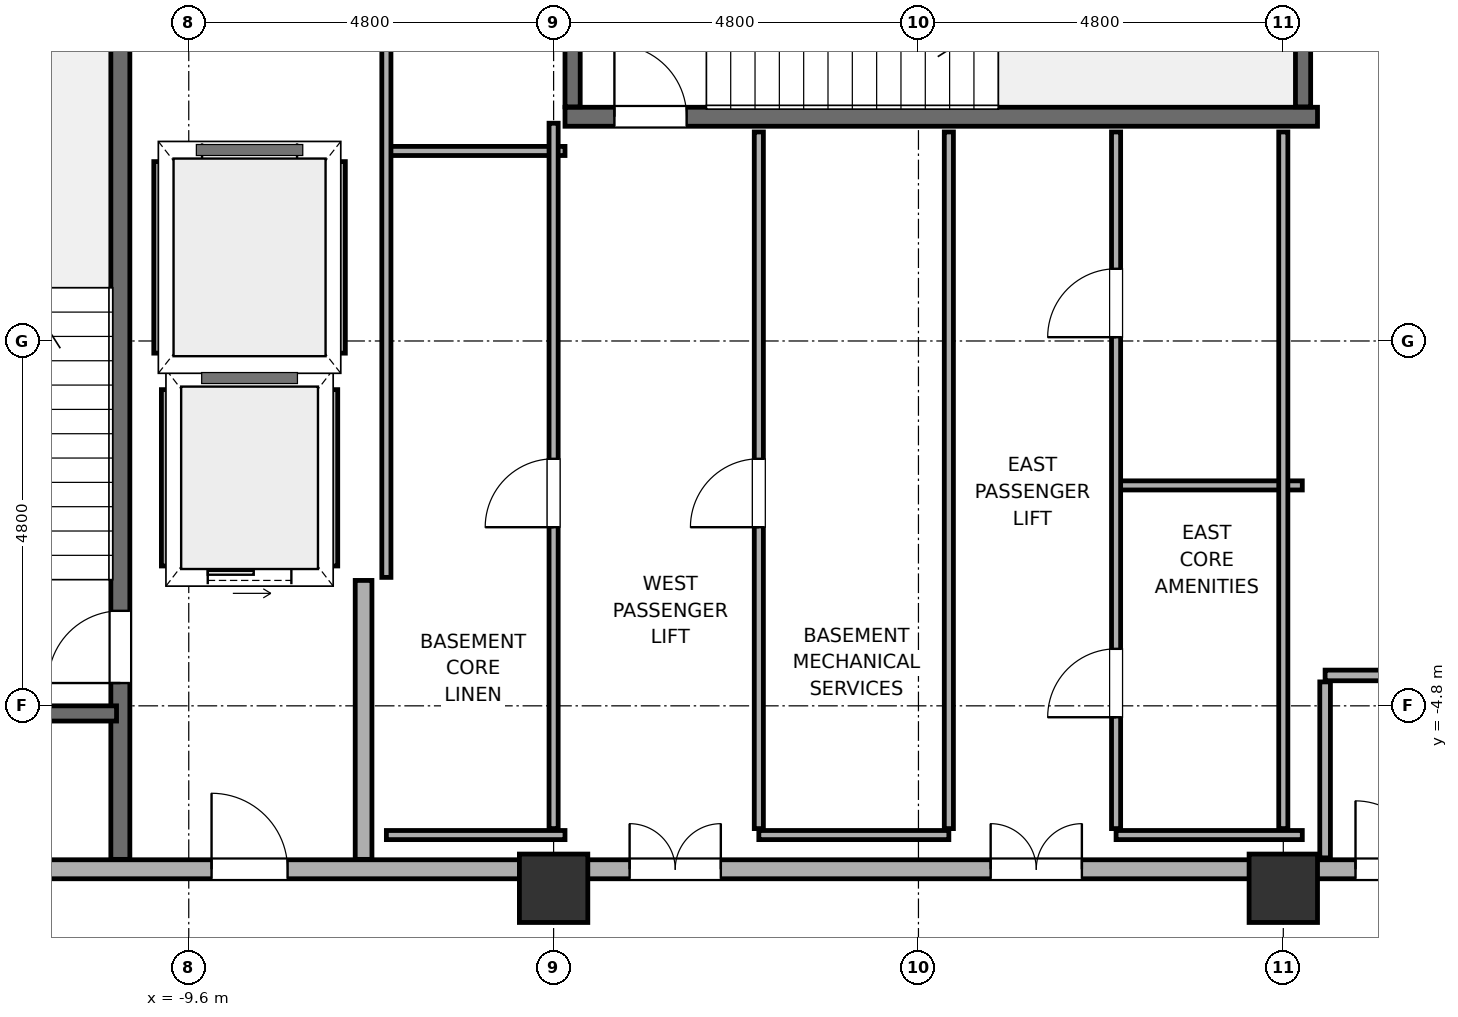
"""IFC4 building model, lengths in metres.
Left out: names, types, materials, properties, quantities, classifications, styles, units other than length and angle.
Written with IfcOpenShell. Run it as: python <this file> out.ifc"""

import sys

from ifc_helpers import new_model, si_unit, direction, frame, frame_2d, origin, origin_2d, place, context, subcontext, project, spatial, rectangle, hollow_rectangle, extrude, element, fill, save


model = new_model("IFC4")
c1 = context("Model", 3, precision=1e-05, world=origin(), true_north=direction((0.0, 1.0)))
c2 = subcontext(c1, "Body", "Model", "MODEL_VIEW")
j1 = project(units=[si_unit("LENGTHUNIT", "METRE"), si_unit("PLANEANGLEUNIT", "RADIAN")], contexts=[c1])
p1 = place(None, origin())
s1 = spatial("IfcSite", under=j1, at=p1, CompositionType="ELEMENT")
p2 = place(p1, origin())
s2 = spatial("IfcBuilding", under=s1, at=p2, CompositionType="ELEMENT")
p3 = place(p2, frame((0.0, 0.0, -10.2)))
s3 = spatial("IfcBuildingStorey", under=s2, at=p3, CompositionType="ELEMENT", Elevation=-10.2)
for number, where, z_axis, x_axis in (
    (1, (-4.8, -7.2, -0.25), (0.0, 0.0, 1.0), (1.0, 0.0, 0.0)),
    (2, (4.8, -7.2, -0.25), (0.0, 0.0, 1.0), (1.0, 0.0, 0.0)),
):
    element("IfcColumn", number, at=place(p3, frame(where, z_axis=z_axis, x_axis=x_axis)), inside=s3, PredefinedType="COLUMN", context=c2, shape_type="SweptSolid", body=[
        extrude(hollow_rectangle(XDim=0.9, YDim=0.9, WallThickness=0.04, at=origin_2d()), origin(), (0.0, 0.0, 1.0), 5.05),
    ])
p4 = place(p3, frame((-14.2, -6.95, 0.0), z_axis=(0.0, 0.0, 1.0), x_axis=(1.0, 0.0, 0.0)))
e3 = element("IfcWall", 3, at=p4, inside=s3, PredefinedType="SOLIDWALL", context=c2, shape_type="SweptSolid", body=[
    extrude(rectangle(XDim=9.4, YDim=0.25, at=frame_2d((4.7, 0.0))), origin(), (0.0, 0.0, 1.0), 3.55),
])
p5 = place(p4, frame((4.9, 0.0, 0.0)))
e4 = element("IfcOpeningElement", 4, at=p5, cuts=e3, PredefinedType="OPENING", context=c2, shape_type="SweptSolid", body=[
    extrude(rectangle(XDim=1.0, YDim=2.15, at=frame_2d((0.5, 1.075))), frame((0.0, 0.14, 0.0), z_axis=(0.0, -1.0, 0.0), x_axis=(1.0, 0.0, 0.0)), (0.0, 0.0, 1.0), 0.28),
])
p6 = place(p3, frame((-4.6, -6.95, 0.0), z_axis=(0.0, 0.0, 1.0), x_axis=(1.0, 0.0, 0.0)))
e5 = element("IfcWall", 5, at=p6, inside=s3, PredefinedType="SOLIDWALL", context=c2, shape_type="SweptSolid", body=[
    extrude(rectangle(XDim=9.2, YDim=0.25, at=frame_2d((4.6, 0.0))), origin(), (0.0, 0.0, 1.0), 3.35),
])
p7 = place(p6, frame((0.8, 0.0, 0.0)))
e6 = element("IfcOpeningElement", 6, at=p7, cuts=e5, PredefinedType="OPENING", context=c2, shape_type="SweptSolid", body=[
    extrude(rectangle(XDim=1.2, YDim=2.2, at=frame_2d((0.6, 1.1))), frame((0.0, 0.14, 0.0), z_axis=(0.0, -1.0, 0.0), x_axis=(1.0, 0.0, 0.0)), (0.0, 0.0, 1.0), 0.28),
])
p8 = place(p6, frame((5.55, 0.0, 0.0)))
e7 = element("IfcOpeningElement", 7, at=p8, cuts=e5, PredefinedType="OPENING", context=c2, shape_type="SweptSolid", body=[
    extrude(rectangle(XDim=1.2, YDim=2.2, at=frame_2d((0.6, 1.1))), frame((0.0, 0.14, 0.0), z_axis=(0.0, -1.0, 0.0), x_axis=(1.0, 0.0, 0.0)), (0.0, 0.0, 1.0), 0.28),
])
p9 = place(p3, frame((4.8, -6.95, 0.0), z_axis=(0.0, 0.0, 1.0), x_axis=(1.0, 0.0, 0.0)))
e8 = element("IfcWall", 8, at=p9, inside=s3, PredefinedType="SOLIDWALL", context=c2, shape_type="SweptSolid", body=[
    extrude(rectangle(XDim=9.4, YDim=0.25, at=frame_2d((4.7, 0.0))), origin(), (0.0, 0.0, 1.0), 3.55),
])
p10 = place(p9, frame((3.5, 0.0, 0.0)))
e9 = element("IfcOpeningElement", 9, at=p10, cuts=e8, PredefinedType="OPENING", context=c2, shape_type="SweptSolid", body=[
    extrude(rectangle(XDim=1.0, YDim=2.15, at=frame_2d((0.5, 1.075))), frame((0.0, 0.14, 0.0), z_axis=(0.0, -1.0, 0.0), x_axis=(1.0, 0.0, 0.0)), (0.0, 0.0, 1.0), 0.28),
])
p11 = place(p9, frame((0.95, 0.0, 0.0)))
e10 = element("IfcOpeningElement", 10, at=p11, cuts=e8, PredefinedType="OPENING", context=c2, shape_type="SweptSolid", body=[
    extrude(rectangle(XDim=0.9, YDim=2.1, at=frame_2d((0.45, 1.05))), frame((0.0, 0.14, 0.0), z_axis=(0.0, -1.0, 0.0), x_axis=(1.0, 0.0, 0.0)), (0.0, 0.0, 1.0), 0.28),
])
p12 = place(p3, frame((-7.3, -6.82, 0.0), z_axis=(0.0, 0.0, 1.0), x_axis=(0.0, 1.0, 0.0)))
e11 = element("IfcWall", 11, at=p12, inside=s3, PredefinedType="SOLIDWALL", context=c2, shape_type="SweptSolid", body=[
    extrude(rectangle(XDim=3.67, YDim=0.22, at=frame_2d((1.835, 0.0))), origin(), (0.0, 0.0, 1.0), 3.55),
])
p13 = place(p3, frame((-10.5, -6.82, -0.25), z_axis=(0.0, 0.0, 1.0), x_axis=(0.0, 1.0, 0.0)))
e12 = element("IfcWall", 12, at=p13, inside=s3, PredefinedType="SOLIDWALL", context=c2, shape_type="SweptSolid", body=[
    extrude(rectangle(XDim=13.64, YDim=0.25, at=frame_2d((6.82, 0.0))), origin(), (0.0, 0.0, 1.0), 4.8),
])
p14 = place(p13, frame((2.32, 0.0, 0.25)))
e13 = element("IfcOpeningElement", 13, at=p14, cuts=e12, PredefinedType="OPENING", context=c2, shape_type="SweptSolid", body=[
    extrude(rectangle(XDim=0.95, YDim=2.15, at=frame_2d((0.475, 1.075))), frame((0.0, 0.14, 0.0), z_axis=(0.0, -1.0, 0.0), x_axis=(1.0, 0.0, 0.0)), (0.0, 0.0, 1.0), 0.28),
])
p15 = place(p3, frame((-14.2, -4.9, -0.25), z_axis=(0.0, 0.0, 1.0), x_axis=(1.0, 0.0, 0.0)))
e14 = element("IfcWall", 14, at=p15, inside=s3, PredefinedType="SOLIDWALL", context=c2, shape_type="SweptSolid", body=[
    extrude(rectangle(XDim=3.65, YDim=0.2, at=frame_2d((1.825, 0.0))), origin(), (0.0, 0.0, 1.0), 4.8),
])
p16 = place(p3, frame((-4.65, 2.95, -0.25), z_axis=(0.0, 0.0, 1.0), x_axis=(1.0, 0.0, 0.0)))
e15 = element("IfcWall", 15, at=p16, inside=s3, PredefinedType="SOLIDWALL", context=c2, shape_type="SweptSolid", body=[
    extrude(rectangle(XDim=9.9, YDim=0.25, at=frame_2d((4.95, 0.0))), origin(), (0.0, 0.0, 1.0), 4.8),
])
p17 = place(p16, frame((0.65, 0.0, 0.25)))
e16 = element("IfcOpeningElement", 16, at=p17, cuts=e15, PredefinedType="OPENING", context=c2, shape_type="SweptSolid", body=[
    extrude(rectangle(XDim=0.95, YDim=2.15, at=frame_2d((0.475, 1.075))), frame((0.0, 0.14, 0.0), z_axis=(0.0, -1.0, 0.0), x_axis=(1.0, 0.0, 0.0)), (0.0, 0.0, 1.0), 0.28),
])
for number, where, z_axis, x_axis in (
    (17, (-4.55, 3.08, -0.25), (0.0, 0.0, 1.0), (0.0, 1.0, 0.0)),
    (18, (5.06, 3.08, -0.25), (0.0, 0.0, 1.0), (0.0, 1.0, 0.0)),
):
    element("IfcWall", number, at=place(p3, frame(where, z_axis=z_axis, x_axis=x_axis)), inside=s3, PredefinedType="SOLIDWALL", context=c2, shape_type="SweptSolid", body=[
        extrude(rectangle(XDim=3.74, YDim=0.2, at=frame_2d((1.87, 0.0))), origin(), (0.0, 0.0, 1.0), 4.8),
    ])
p18 = place(p3, frame((-9.82, -3.1, 0.0), z_axis=(0.0, 0.0, 1.0), x_axis=(1.0, 0.0, 0.0)))
e19 = element("IfcWall", 19, at=p18, inside=s3, PredefinedType="SOLIDWALL", context=c2, shape_type="SweptSolid", body=[
    extrude(rectangle(XDim=2.04, YDim=0.2, at=frame_2d((1.02, 0.0))), origin(), (0.0, 0.0, 1.0), 4.55),
])
p19 = place(p18, frame((0.47, 0.0, 0.0)))
e20 = element("IfcOpeningElement", 20, at=p19, cuts=e19, PredefinedType="OPENING", context=c2, shape_type="SweptSolid", body=[
    extrude(rectangle(XDim=1.1, YDim=2.2, at=frame_2d((0.55, 1.1))), frame((0.0, 0.115, 0.0), z_axis=(0.0, -1.0, 0.0), x_axis=(1.0, 0.0, 0.0)), (0.0, 0.0, 1.0), 0.23),
])
p20 = place(p3, frame((-9.82, -0.5, 0.0), z_axis=(0.0, 0.0, 1.0), x_axis=(1.0, 0.0, 0.0)))
e21 = element("IfcWall", 21, at=p20, inside=s3, PredefinedType="SOLIDWALL", context=c2, shape_type="SweptSolid", body=[
    extrude(rectangle(XDim=2.04, YDim=0.2, at=frame_2d((1.02, 0.0))), origin(), (0.0, 0.0, 1.0), 4.55),
])
for number, where, z_axis, x_axis in (
    (22, (-9.9, -2.96, 0.0), (0.0, 0.0, 1.0), (0.0, 1.0, 0.0)),
    (23, (-7.7, -2.96, 0.0), (0.0, 0.0, 1.0), (0.0, 1.0, 0.0)),
):
    element("IfcWall", number, at=place(p3, frame(where, z_axis=z_axis, x_axis=x_axis)), inside=s3, PredefinedType="PARTITIONING", context=c2, shape_type="SweptSolid", body=[
        extrude(rectangle(XDim=2.32, YDim=0.12, at=frame_2d((1.16, 0.0))), origin(), (0.0, 0.0, 1.0), 4.55),
    ])
p21 = place(p3, frame((-9.92, 2.5, 0.0), z_axis=(0.0, 0.0, 1.0), x_axis=(1.0, 0.0, 0.0)))
e24 = element("IfcWall", 24, at=p21, inside=s3, PredefinedType="SOLIDWALL", context=c2, shape_type="SweptSolid", body=[
    extrude(rectangle(XDim=2.24, YDim=0.2, at=frame_2d((1.12, 0.0))), origin(), (0.0, 0.0, 1.0), 4.55),
])
p22 = place(p21, frame((0.495, 0.0, 0.0)))
e25 = element("IfcOpeningElement", 25, at=p22, cuts=e24, PredefinedType="OPENING", context=c2, shape_type="SweptSolid", body=[
    extrude(rectangle(XDim=1.25, YDim=2.25, at=frame_2d((0.625, 1.125))), frame((0.0, 0.115, 0.0), z_axis=(0.0, -1.0, 0.0), x_axis=(1.0, 0.0, 0.0)), (0.0, 0.0, 1.0), 0.23),
])
p23 = place(p3, frame((-9.92, -0.3, 0.0), z_axis=(0.0, 0.0, 1.0), x_axis=(1.0, 0.0, 0.0)))
e26 = element("IfcWall", 26, at=p23, inside=s3, PredefinedType="SOLIDWALL", context=c2, shape_type="SweptSolid", body=[
    extrude(rectangle(XDim=2.24, YDim=0.2, at=frame_2d((1.12, 0.0))), origin(), (0.0, 0.0, 1.0), 4.55),
])
for number, where, z_axis, x_axis in (
    (27, (-10.0, -0.16, 0.0), (0.0, 0.0, 1.0), (0.0, 1.0, 0.0)),
    (28, (-7.6, -0.16, 0.0), (0.0, 0.0, 1.0), (0.0, 1.0, 0.0)),
):
    element("IfcWall", number, at=place(p3, frame(where, z_axis=z_axis, x_axis=x_axis)), inside=s3, PredefinedType="PARTITIONING", context=c2, shape_type="SweptSolid", body=[
        extrude(rectangle(XDim=2.52, YDim=0.12, at=frame_2d((1.26, 0.0))), origin(), (0.0, 0.0, 1.0), 4.55),
    ])
p24 = place(p3, frame((-7.0, -6.5, 0.0), z_axis=(0.0, 0.0, 1.0), x_axis=(1.0, 0.0, 0.0)))
e29 = element("IfcWall", 29, at=p24, inside=s3, PredefinedType="PARTITIONING", context=c2, shape_type="SweptSolid", body=[
    extrude(rectangle(XDim=2.35, YDim=0.12, at=frame_2d((1.175, 0.0))), origin(), (0.0, 0.0, 1.0), 4.55),
])
p25 = place(p3, frame((-2.1, -6.5, 0.0), z_axis=(0.0, 0.0, 1.0), x_axis=(1.0, 0.0, 0.0)))
e30 = element("IfcWall", 30, at=p25, inside=s3, PredefinedType="PARTITIONING", context=c2, shape_type="SweptSolid", body=[
    extrude(rectangle(XDim=2.5, YDim=0.12, at=frame_2d((1.25, 0.0))), origin(), (0.0, 0.0, 1.0), 4.55),
])
p26 = place(p3, frame((2.6, -6.5, 0.0), z_axis=(0.0, 0.0, 1.0), x_axis=(1.0, 0.0, 0.0)))
e31 = element("IfcWall", 31, at=p26, inside=s3, PredefinedType="PARTITIONING", context=c2, shape_type="SweptSolid", body=[
    extrude(rectangle(XDim=2.45, YDim=0.12, at=frame_2d((1.225, 0.0))), origin(), (0.0, 0.0, 1.0), 4.55),
])
p27 = place(p3, frame((5.35, -4.4, 0.0), z_axis=(0.0, 0.0, 1.0), x_axis=(1.0, 0.0, 0.0)))
e32 = element("IfcWall", 32, at=p27, inside=s3, PredefinedType="PLUMBINGWALL", context=c2, shape_type="SweptSolid", body=[
    extrude(rectangle(XDim=1.65, YDim=0.14, at=frame_2d((0.825, 0.0))), origin(), (0.0, 0.0, 1.0), 4.55),
])
p28 = place(p3, frame((2.6, -1.9, 0.0), z_axis=(0.0, 0.0, 1.0), x_axis=(1.0, 0.0, 0.0)))
e33 = element("IfcWall", 33, at=p28, inside=s3, PredefinedType="PARTITIONING", context=c2, shape_type="SweptSolid", body=[
    extrude(rectangle(XDim=2.45, YDim=0.12, at=frame_2d((1.225, 0.0))), origin(), (0.0, 0.0, 1.0), 4.55),
])
p29 = place(p3, frame((-7.0, 2.5, 0.0), z_axis=(0.0, 0.0, 1.0), x_axis=(1.0, 0.0, 0.0)))
e34 = element("IfcWall", 34, at=p29, inside=s3, PredefinedType="PARTITIONING", context=c2, shape_type="SweptSolid", body=[
    extrude(rectangle(XDim=2.35, YDim=0.12, at=frame_2d((1.175, 0.0))), origin(), (0.0, 0.0, 1.0), 4.55),
])
p30 = place(p3, frame((-7.0, -3.11, 0.0), z_axis=(0.0, 0.0, 1.0), x_axis=(0.0, 1.0, 0.0)))
e35 = element("IfcWall", 35, at=p30, inside=s3, PredefinedType="PARTITIONING", context=c2, shape_type="SweptSolid", body=[
    extrude(rectangle(XDim=9.575, YDim=0.12, at=frame_2d((4.788, 0.0))), origin(), (0.0, 0.0, 1.0), 4.55),
])
p31 = place(p30, frame((7.16, 0.0, 0.0)))
e36 = element("IfcOpeningElement", 36, at=p31, cuts=e35, PredefinedType="OPENING", context=c2, shape_type="SweptSolid", body=[
    extrude(rectangle(XDim=0.9, YDim=2.1, at=frame_2d((0.45, 1.05))), frame((0.0, 0.075, 0.0), z_axis=(0.0, -1.0, 0.0), x_axis=(1.0, 0.0, 0.0)), (0.0, 0.0, 1.0), 0.15),
])
p32 = place(p3, frame((-4.8, -6.415, 0.0), z_axis=(0.0, 0.0, 1.0), x_axis=(0.0, 1.0, 0.0)))
e37 = element("IfcWall", 37, at=p32, inside=s3, PredefinedType="PARTITIONING", context=c2, shape_type="SweptSolid", body=[
    extrude(rectangle(XDim=9.28, YDim=0.12, at=frame_2d((4.64, 0.0))), origin(), (0.0, 0.0, 1.0), 4.55),
])
p33 = place(p32, frame((3.965, 0.0, 0.0)))
e38 = element("IfcOpeningElement", 38, at=p33, cuts=e37, PredefinedType="OPENING", context=c2, shape_type="SweptSolid", body=[
    extrude(rectangle(XDim=0.9, YDim=2.1, at=frame_2d((0.45, 1.05))), frame((0.0, 0.075, 0.0), z_axis=(0.0, -1.0, 0.0), x_axis=(1.0, 0.0, 0.0)), (0.0, 0.0, 1.0), 0.15),
])
p34 = place(p3, frame((-2.1, -6.415, 0.0), z_axis=(0.0, 0.0, 1.0), x_axis=(0.0, 1.0, 0.0)))
e39 = element("IfcWall", 39, at=p34, inside=s3, PredefinedType="PARTITIONING", context=c2, shape_type="SweptSolid", body=[
    extrude(rectangle(XDim=9.165, YDim=0.12, at=frame_2d((4.583, 0.0))), origin(), (0.0, 0.0, 1.0), 4.55),
])
p35 = place(p34, frame((3.965, 0.0, 0.0)))
e40 = element("IfcOpeningElement", 40, at=p35, cuts=e39, PredefinedType="OPENING", context=c2, shape_type="SweptSolid", body=[
    extrude(rectangle(XDim=0.9, YDim=2.1, at=frame_2d((0.45, 1.05))), frame((0.0, 0.075, 0.0), z_axis=(0.0, -1.0, 0.0), x_axis=(1.0, 0.0, 0.0)), (0.0, 0.0, 1.0), 0.15),
])
p36 = place(p3, frame((0.4, -6.415, 0.0), z_axis=(0.0, 0.0, 1.0), x_axis=(0.0, 1.0, 0.0)))
e41 = element("IfcWall", 41, at=p36, inside=s3, PredefinedType="PARTITIONING", context=c2, shape_type="SweptSolid", body=[
    extrude(rectangle(XDim=9.165, YDim=0.12, at=frame_2d((4.583, 0.0))), origin(), (0.0, 0.0, 1.0), 4.55),
])
p37 = place(p3, frame((2.6, -6.415, 0.0), z_axis=(0.0, 0.0, 1.0), x_axis=(0.0, 1.0, 0.0)))
e42 = element("IfcWall", 42, at=p37, inside=s3, PredefinedType="PARTITIONING", context=c2, shape_type="SweptSolid", body=[
    extrude(rectangle(XDim=9.165, YDim=0.12, at=frame_2d((4.583, 0.0))), origin(), (0.0, 0.0, 1.0), 4.55),
])
p38 = place(p37, frame((1.465, 0.0, 0.0)))
e43 = element("IfcOpeningElement", 43, at=p38, cuts=e42, PredefinedType="OPENING", context=c2, shape_type="SweptSolid", body=[
    extrude(rectangle(XDim=0.9, YDim=2.1, at=frame_2d((0.45, 1.05))), frame((0.0, 0.075, 0.0), z_axis=(0.0, -1.0, 0.0), x_axis=(1.0, 0.0, 0.0)), (0.0, 0.0, 1.0), 0.15),
])
p39 = place(p37, frame((6.465, 0.0, 0.0)))
e44 = element("IfcOpeningElement", 44, at=p39, cuts=e42, PredefinedType="OPENING", context=c2, shape_type="SweptSolid", body=[
    extrude(rectangle(XDim=0.9, YDim=2.1, at=frame_2d((0.45, 1.05))), frame((0.0, 0.075, 0.0), z_axis=(0.0, -1.0, 0.0), x_axis=(1.0, 0.0, 0.0)), (0.0, 0.0, 1.0), 0.15),
])
p40 = place(p3, frame((4.8, -6.415, 0.0), z_axis=(0.0, 0.0, 1.0), x_axis=(0.0, 1.0, 0.0)))
e45 = element("IfcWall", 45, at=p40, inside=s3, PredefinedType="PARTITIONING", context=c2, shape_type="SweptSolid", body=[
    extrude(rectangle(XDim=9.165, YDim=0.12, at=frame_2d((4.583, 0.0))), origin(), (0.0, 0.0, 1.0), 4.55),
])
p41 = place(p3, frame((5.35, -6.8, 0.0), z_axis=(0.0, 0.0, 1.0), x_axis=(0.0, 1.0, 0.0)))
e46 = element("IfcWall", 46, at=p41, inside=s3, PredefinedType="PLUMBINGWALL", context=c2, shape_type="SweptSolid", body=[
    extrude(rectangle(XDim=2.315, YDim=0.14, at=frame_2d((1.157, 0.0))), origin(), (0.0, 0.0, 1.0), 3.55),
])
p42 = place(p5, origin())
e47 = element("IfcDoor", 47, at=p42, inside=s3, OperationType="SINGLE_SWING_RIGHT", PredefinedType="DOOR", context=c2, shape_type="SweptSolid", body=[
    extrude(rectangle(XDim=1.0, YDim=2.15, at=frame_2d((0.5, 1.075))), frame((0.0, 0.025, 0.0), z_axis=(0.0, -1.0, 0.0), x_axis=(1.0, 0.0, 0.0)), (0.0, 0.0, 1.0), 0.05),
])
fill(e4, e47)
p43 = place(p7, origin())
e48 = element("IfcDoor", 48, at=p43, inside=s3, OperationType="DOUBLE_DOOR_SINGLE_SWING", PredefinedType="DOOR", context=c2, shape_type="SweptSolid", body=[
    extrude(rectangle(XDim=1.2, YDim=2.2, at=frame_2d((0.6, 1.1))), frame((0.0, 0.025, 0.0), z_axis=(0.0, -1.0, 0.0), x_axis=(1.0, 0.0, 0.0)), (0.0, 0.0, 1.0), 0.05),
])
fill(e6, e48)
p44 = place(p8, origin())
e49 = element("IfcDoor", 49, at=p44, inside=s3, OperationType="DOUBLE_DOOR_SINGLE_SWING", PredefinedType="DOOR", context=c2, shape_type="SweptSolid", body=[
    extrude(rectangle(XDim=1.2, YDim=2.2, at=frame_2d((0.6, 1.1))), frame((0.0, 0.025, 0.0), z_axis=(0.0, -1.0, 0.0), x_axis=(1.0, 0.0, 0.0)), (0.0, 0.0, 1.0), 0.05),
])
fill(e7, e49)
p45 = place(p14, origin())
e50 = element("IfcDoor", 50, at=p45, inside=s3, OperationType="SINGLE_SWING_RIGHT", PredefinedType="DOOR", context=c2, shape_type="SweptSolid", body=[
    extrude(rectangle(XDim=0.95, YDim=2.15, at=frame_2d((0.475, 1.075))), frame((0.0, 0.025, 0.0), z_axis=(0.0, -1.0, 0.0), x_axis=(1.0, 0.0, 0.0)), (0.0, 0.0, 1.0), 0.05),
])
fill(e13, e50)
p46 = place(p17, origin())
e51 = element("IfcDoor", 51, at=p46, inside=s3, OperationType="SINGLE_SWING_RIGHT", PredefinedType="DOOR", context=c2, shape_type="SweptSolid", body=[
    extrude(rectangle(XDim=0.95, YDim=2.15, at=frame_2d((0.475, 1.075))), frame((0.0, 0.025, 0.0), z_axis=(0.0, -1.0, 0.0), x_axis=(1.0, 0.0, 0.0)), (0.0, 0.0, 1.0), 0.05),
])
fill(e16, e51)
p47 = place(p19, origin())
e52 = element("IfcDoor", 52, at=p47, inside=s3, OperationType="SLIDING_TO_LEFT", PredefinedType="DOOR", context=c2, shape_type="SweptSolid", body=[
    extrude(rectangle(XDim=1.1, YDim=2.2, at=frame_2d((0.55, 1.1))), frame((0.0, 0.025, 0.0), z_axis=(0.0, -1.0, 0.0), x_axis=(1.0, 0.0, 0.0)), (0.0, 0.0, 1.0), 0.05),
])
fill(e20, e52)
p48 = place(p22, origin())
e53 = element("IfcDoor", 53, at=p48, inside=s3, OperationType="SLIDING_TO_LEFT", PredefinedType="DOOR", context=c2, shape_type="SweptSolid", body=[
    extrude(rectangle(XDim=1.25, YDim=2.25, at=frame_2d((0.625, 1.125))), frame((0.0, 0.025, 0.0), z_axis=(0.0, -1.0, 0.0), x_axis=(1.0, 0.0, 0.0)), (0.0, 0.0, 1.0), 0.05),
])
fill(e25, e53)
p49 = place(p33, origin())
e54 = element("IfcDoor", 54, at=p49, inside=s3, OperationType="SINGLE_SWING_LEFT", PredefinedType="DOOR", context=c2, shape_type="SweptSolid", body=[
    extrude(rectangle(XDim=0.9, YDim=2.1, at=frame_2d((0.45, 1.05))), frame((0.0, 0.025, 0.0), z_axis=(0.0, -1.0, 0.0), x_axis=(1.0, 0.0, 0.0)), (0.0, 0.0, 1.0), 0.05),
])
fill(e38, e54)
p50 = place(p35, origin())
e55 = element("IfcDoor", 55, at=p50, inside=s3, OperationType="SINGLE_SWING_LEFT", PredefinedType="DOOR", context=c2, shape_type="SweptSolid", body=[
    extrude(rectangle(XDim=0.9, YDim=2.1, at=frame_2d((0.45, 1.05))), frame((0.0, 0.025, 0.0), z_axis=(0.0, -1.0, 0.0), x_axis=(1.0, 0.0, 0.0)), (0.0, 0.0, 1.0), 0.05),
])
fill(e40, e55)
p51 = place(p38, origin())
e56 = element("IfcDoor", 56, at=p51, inside=s3, OperationType="SINGLE_SWING_LEFT", PredefinedType="DOOR", context=c2, shape_type="SweptSolid", body=[
    extrude(rectangle(XDim=0.9, YDim=2.1, at=frame_2d((0.45, 1.05))), frame((0.0, 0.025, 0.0), z_axis=(0.0, -1.0, 0.0), x_axis=(1.0, 0.0, 0.0)), (0.0, 0.0, 1.0), 0.05),
])
fill(e43, e56)
p52 = place(p39, origin())
e57 = element("IfcDoor", 57, at=p52, inside=s3, OperationType="SINGLE_SWING_RIGHT", PredefinedType="DOOR", context=c2, shape_type="SweptSolid", body=[
    extrude(rectangle(XDim=0.9, YDim=2.1, at=frame_2d((0.45, 1.05))), frame((0.0, 0.025, 0.0), z_axis=(0.0, -1.0, 0.0), x_axis=(1.0, 0.0, 0.0)), (0.0, 0.0, 1.0), 0.05),
])
fill(e44, e57)
p53 = place(p11, origin())
e58 = element("IfcDoor", 58, at=p53, inside=s3, OperationType="SINGLE_SWING_LEFT", PredefinedType="DOOR", context=c2, shape_type="SweptSolid", body=[
    extrude(rectangle(XDim=0.9, YDim=2.1, at=frame_2d((0.45, 1.05))), frame((0.0, 0.025, 0.0), z_axis=(0.0, -1.0, 0.0), x_axis=(1.0, 0.0, 0.0)), (0.0, 0.0, 1.0), 0.05),
])
fill(e10, e58)
save(model, sys.argv[1])
